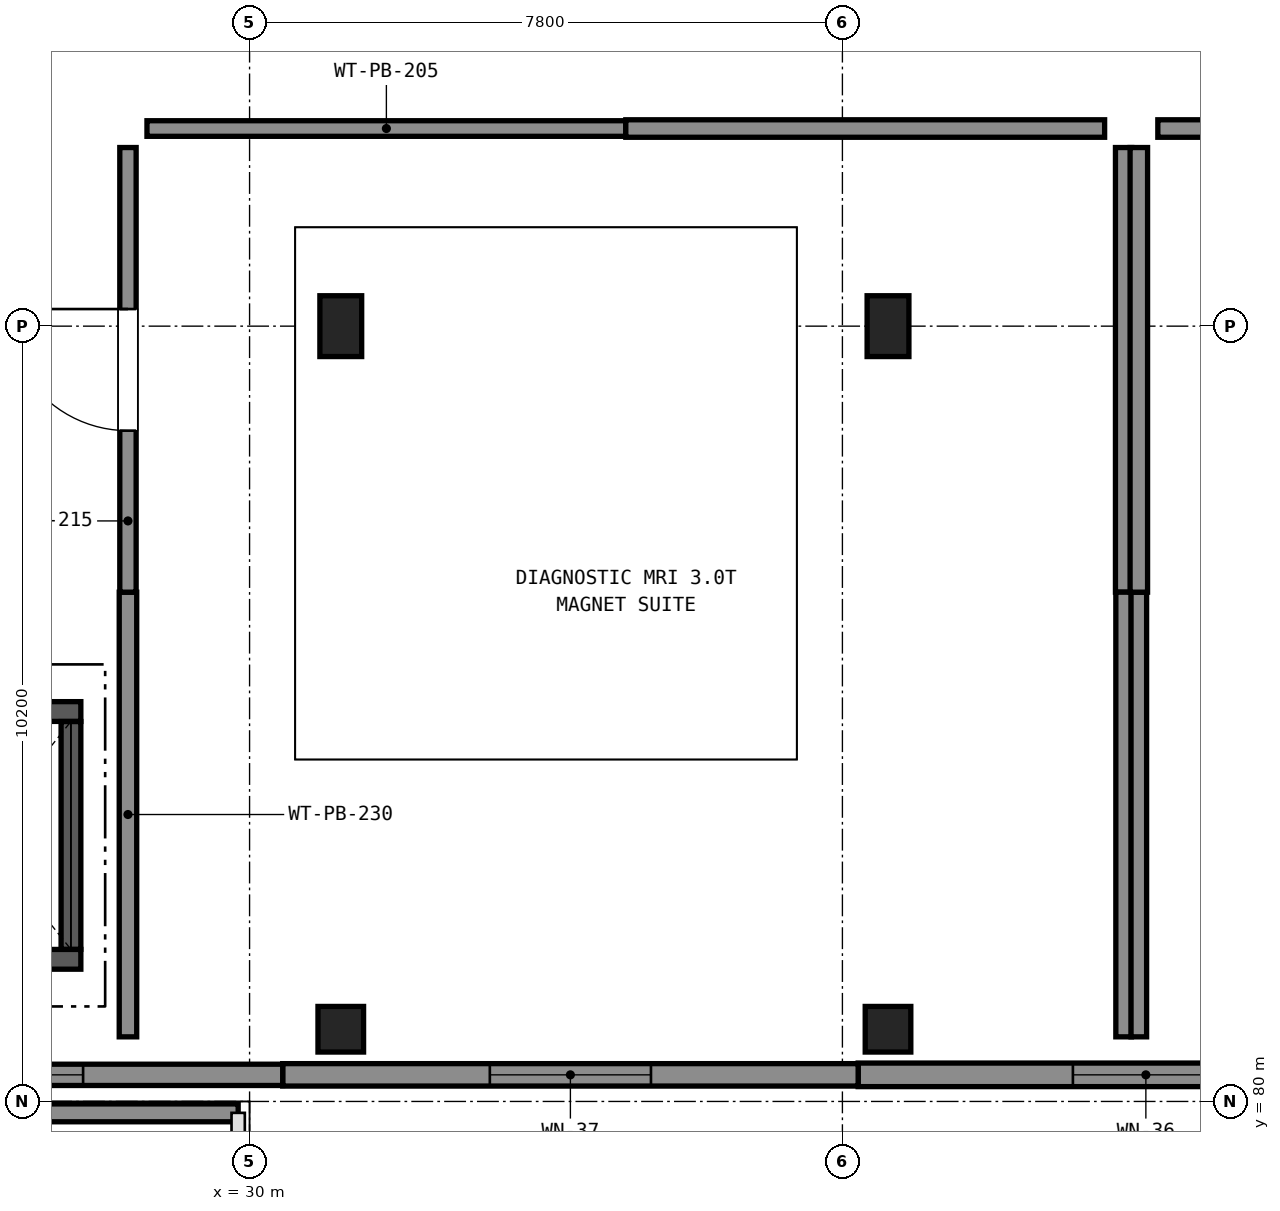
"""IFC4 building model, lengths in metres.
Left out: names, types, materials, properties, quantities, classifications, styles, units other than length and angle.
Written with IfcOpenShell. Run it as: python <this file> out.ifc"""

import sys

from ifc_helpers import new_model, si_unit, direction, frame, frame_2d, origin, origin_2d, place, context, subcontext, project, spatial, rectangle, extrude, element, fill, save


model = new_model("IFC4")
c1 = context("Model", 3, precision=1e-05, world=origin(), true_north=direction((0.0, 1.0)))
c2 = subcontext(c1, "Body", "Model", "MODEL_VIEW")
j1 = project(units=[si_unit("LENGTHUNIT", "METRE"), si_unit("PLANEANGLEUNIT", "RADIAN")], contexts=[c1])
p1 = place(None, origin())
s1 = spatial("IfcSite", under=j1, at=p1, CompositionType="ELEMENT")
p2 = place(p1, origin())
s2 = spatial("IfcBuilding", under=s1, at=p2, CompositionType="ELEMENT")
p3 = place(p2, origin())
s3 = spatial("IfcBuildingStorey", under=s2, at=p3, CompositionType="ELEMENT", Elevation=0.0)
p4 = place(p3, frame((31.2, 80.95, 0.0), z_axis=(0.0, 0.0, 1.0), x_axis=(1.0, 0.0, 0.0)))
e1 = element("IfcColumn", 1, at=p4, inside=s3, PredefinedType="COLUMN", context=c2, shape_type="SweptSolid", body=[
    extrude(rectangle(XDim=0.6, YDim=0.6, at=origin_2d()), origin(), (0.0, 0.0, 1.0), 5.1),
])
p5 = place(p3, frame((31.2, 90.2, 0.0), z_axis=(0.0, 0.0, 1.0), x_axis=(1.0, 0.0, 0.0)))
e2 = element("IfcColumn", 2, at=p5, inside=s3, PredefinedType="COLUMN", context=c2, shape_type="SweptSolid", body=[
    extrude(rectangle(XDim=0.55, YDim=0.8, at=origin_2d()), origin(), (0.0, 0.0, 1.0), 5.1),
])
p6 = place(p3, frame((38.4, 80.95, 0.0), z_axis=(0.0, 0.0, 1.0), x_axis=(1.0, 0.0, 0.0)))
e3 = element("IfcColumn", 3, at=p6, inside=s3, PredefinedType="COLUMN", context=c2, shape_type="SweptSolid", body=[
    extrude(rectangle(XDim=0.6, YDim=0.6, at=origin_2d()), origin(), (0.0, 0.0, 1.0), 5.1),
])
p7 = place(p3, frame((38.4, 90.2, 0.0), z_axis=(0.0, 0.0, 1.0), x_axis=(1.0, 0.0, 0.0)))
e4 = element("IfcColumn", 4, at=p7, inside=s3, PredefinedType="COLUMN", context=c2, shape_type="SweptSolid", body=[
    extrude(rectangle(XDim=0.55, YDim=0.8, at=origin_2d()), origin(), (0.0, 0.0, 1.0), 5.1),
])
p8 = place(p3, frame((22.425, 79.85, 0.0), z_axis=(0.0, 0.0, 1.0), x_axis=(1.0, 0.0, 0.0)))
e5 = element("IfcWall", 5, at=p8, inside=s3, PredefinedType="SOLIDWALL", context=c2, shape_type="SweptSolid", body=[
    extrude(rectangle(XDim=7.425, YDim=0.235, at=frame_2d((3.712, 0.0))), origin(), (0.0, 0.0, 1.0), 4.81),
])
p9 = place(p8, frame((2.888, 0.0, 0.9)))
e6 = element("IfcOpeningElement", 6, at=p9, cuts=e5, PredefinedType="OPENING", context=c2, shape_type="SweptSolid", body=[
    extrude(rectangle(XDim=1.65, YDim=1.5, at=frame_2d((0.825, 0.75))), frame((0.0, 0.127, 0.0), z_axis=(0.0, -1.0, 0.0), x_axis=(1.0, 0.0, 0.0)), (0.0, 0.0, 1.0), 0.255),
])
p10 = place(p3, frame((45.579, 80.35, 0.0), z_axis=(0.0, 0.0, 1.0), x_axis=(-1.0, 0.0, 0.0)))
e7 = element("IfcWall", 7, at=p10, inside=s3, PredefinedType="SOLIDWALL", context=c2, shape_type="SweptSolid", body=[
    extrude(rectangle(XDim=7.572, YDim=0.31, at=frame_2d((3.786, 0.0))), origin(), (0.0, 0.0, 1.0), 4.785),
])
p11 = place(p10, frame((2.826, 0.0, 0.9)))
e8 = element("IfcOpeningElement", 8, at=p11, cuts=e7, PredefinedType="OPENING", context=c2, shape_type="SweptSolid", body=[
    extrude(rectangle(XDim=1.92, YDim=1.62, at=frame_2d((0.96, 0.81))), frame((0.0, 0.165, 0.0), z_axis=(0.0, -1.0, 0.0), x_axis=(1.0, 0.0, 0.0)), (0.0, 0.0, 1.0), 0.33),
])
p12 = place(p3, frame((38.007, 80.35, 0.0), z_axis=(0.0, 0.0, 1.0), x_axis=(-1.0, 0.0, 0.0)))
e9 = element("IfcWall", 9, at=p12, inside=s3, PredefinedType="SOLIDWALL", context=c2, shape_type="SweptSolid", body=[
    extrude(rectangle(XDim=7.571, YDim=0.295, at=frame_2d((3.786, 0.0))), origin(), (0.0, 0.0, 1.0), 4.785),
])
p13 = place(p12, frame((2.726, 0.0, 0.9)))
e10 = element("IfcOpeningElement", 10, at=p13, cuts=e9, PredefinedType="OPENING", context=c2, shape_type="SweptSolid", body=[
    extrude(rectangle(XDim=2.12, YDim=1.62, at=frame_2d((1.06, 0.81))), frame((0.0, 0.157, 0.0), z_axis=(0.0, -1.0, 0.0), x_axis=(1.0, 0.0, 0.0)), (0.0, 0.0, 1.0), 0.315),
])
p14 = place(p3, frame((30.436, 80.35, 0.0), z_axis=(0.0, 0.0, 1.0), x_axis=(-1.0, 0.0, 0.0)))
e11 = element("IfcWall", 11, at=p14, inside=s3, PredefinedType="SOLIDWALL", context=c2, shape_type="SweptSolid", body=[
    extrude(rectangle(XDim=7.572, YDim=0.28, at=frame_2d((3.786, 0.0))), origin(), (0.0, 0.0, 1.0), 4.785),
])
p15 = place(p14, frame((2.626, 0.0, 0.9)))
e12 = element("IfcOpeningElement", 12, at=p15, cuts=e11, PredefinedType="OPENING", context=c2, shape_type="SweptSolid", body=[
    extrude(rectangle(XDim=2.32, YDim=1.62, at=frame_2d((1.16, 0.81))), frame((0.0, 0.15, 0.0), z_axis=(0.0, -1.0, 0.0), x_axis=(1.0, 0.0, 0.0)), (0.0, 0.0, 1.0), 0.3),
])
p16 = place(p3, frame((25.122, 81.87, 0.0), z_axis=(0.0, 0.0, 1.0), x_axis=(1.0, 0.0, 0.0)))
e13 = element("IfcWall", 13, at=p16, inside=s3, PredefinedType="SHEAR", context=c2, shape_type="SweptSolid", body=[
    extrude(rectangle(XDim=2.658, YDim=0.26, at=frame_2d((1.329, 0.0))), origin(), (0.0, 0.0, 1.0), 4.785),
])
p17 = place(p3, frame((25.122, 85.13, 0.0), z_axis=(0.0, 0.0, 1.0), x_axis=(1.0, 0.0, 0.0)))
e14 = element("IfcWall", 14, at=p17, inside=s3, PredefinedType="SHEAR", context=c2, shape_type="SweptSolid", body=[
    extrude(rectangle(XDim=2.658, YDim=0.26, at=frame_2d((1.329, 0.0))), origin(), (0.0, 0.0, 1.0), 4.785),
])
p18 = place(p17, frame((0.679, 0.0, 0.0)))
e15 = element("IfcOpeningElement", 15, at=p18, cuts=e14, PredefinedType="OPENING", context=c2, shape_type="SweptSolid", body=[
    extrude(rectangle(XDim=1.3, YDim=2.2, at=frame_2d((0.65, 1.1))), frame((0.0, 0.14, 0.0), z_axis=(0.0, -1.0, 0.0), x_axis=(1.0, 0.0, 0.0)), (0.0, 0.0, 1.0), 0.28),
])
p19 = place(p3, frame((27.65, 82.002, 0.0), z_axis=(0.0, 0.0, 1.0), x_axis=(0.0, 1.0, 0.0)))
e16 = element("IfcWall", 16, at=p19, inside=s3, PredefinedType="SHEAR", context=c2, shape_type="SweptSolid", body=[
    extrude(rectangle(XDim=2.996, YDim=0.26, at=frame_2d((1.498, 0.0))), origin(), (0.0, 0.0, 1.0), 4.785),
])
p20 = place(p3, frame((28.4, 80.85, 0.0), z_axis=(0.0, 0.0, 1.0), x_axis=(0.0, 1.0, 0.0)))
e17 = element("IfcWall", 17, at=p20, inside=s3, PredefinedType="PARTITIONING", context=c2, shape_type="SweptSolid", body=[
    extrude(rectangle(XDim=5.85, YDim=0.23, at=frame_2d((2.925, 0.0))), origin(), (0.0, 0.0, 1.0), 4.425),
])
p21 = place(p3, frame((28.4, 86.7, 0.0), z_axis=(0.0, 0.0, 1.0), x_axis=(0.0, 1.0, 0.0)))
e18 = element("IfcWall", 18, at=p21, inside=s3, PredefinedType="PARTITIONING", context=c2, shape_type="SweptSolid", body=[
    extrude(rectangle(XDim=5.85, YDim=0.215, at=frame_2d((2.925, 0.0))), origin(), (0.0, 0.0, 1.0), 4.425),
])
p22 = place(p21, frame((2.125, 0.0, 0.0)))
e19 = element("IfcOpeningElement", 19, at=p22, cuts=e18, PredefinedType="OPENING", context=c2, shape_type="SweptSolid", body=[
    extrude(rectangle(XDim=1.6, YDim=2.35, at=frame_2d((0.8, 1.175))), frame((0.0, 0.117, 0.0), z_axis=(0.0, -1.0, 0.0), x_axis=(1.0, 0.0, 0.0)), (0.0, 0.0, 1.0), 0.235),
])
p23 = place(p3, frame((28.65, 92.8, 0.0), z_axis=(0.0, 0.0, 1.0), x_axis=(1.0, 0.0, 0.0)))
e20 = element("IfcWall", 20, at=p23, inside=s3, PredefinedType="PARTITIONING", context=c2, shape_type="SweptSolid", body=[
    extrude(rectangle(XDim=6.3, YDim=0.205, at=frame_2d((3.15, 0.0))), origin(), (0.0, 0.0, 1.0), 4.135),
])
p24 = place(p3, frame((34.95, 92.8, 0.0), z_axis=(0.0, 0.0, 1.0), x_axis=(1.0, 0.0, 0.0)))
e21 = element("IfcWall", 21, at=p24, inside=s3, PredefinedType="PARTITIONING", context=c2, shape_type="SweptSolid", body=[
    extrude(rectangle(XDim=6.3, YDim=0.23, at=frame_2d((3.15, 0.0))), origin(), (0.0, 0.0, 1.0), 3.985),
])
p25 = place(p3, frame((41.5, 92.55, 0.0), z_axis=(0.0, 0.0, 1.0), x_axis=(0.0, -1.0, 0.0)))
e22 = element("IfcWall", 22, at=p25, inside=s3, PredefinedType="PARTITIONING", context=c2, shape_type="SweptSolid", body=[
    extrude(rectangle(XDim=5.85, YDim=0.215, at=frame_2d((2.925, 0.0))), origin(), (0.0, 0.0, 1.0), 4.425),
])
p26 = place(p3, frame((41.5, 86.7, 0.0), z_axis=(0.0, 0.0, 1.0), x_axis=(0.0, -1.0, 0.0)))
e23 = element("IfcWall", 23, at=p26, inside=s3, PredefinedType="PARTITIONING", context=c2, shape_type="SweptSolid", body=[
    extrude(rectangle(XDim=5.85, YDim=0.205, at=frame_2d((2.925, 0.0))), origin(), (0.0, 0.0, 1.0), 4.425),
])
p27 = place(p3, frame((41.95, 92.8, 0.0), z_axis=(0.0, 0.0, 1.0), x_axis=(1.0, 0.0, 0.0)))
e24 = element("IfcWall", 24, at=p27, inside=s3, PredefinedType="PARTITIONING", context=c2, shape_type="SweptSolid", body=[
    extrude(rectangle(XDim=5.3, YDim=0.23, at=frame_2d((2.65, 0.0))), origin(), (0.0, 0.0, 1.0), 4.185),
])
p28 = place(p27, frame((1.8, 0.0, 0.0)))
e25 = element("IfcOpeningElement", 25, at=p28, cuts=e24, PredefinedType="OPENING", context=c2, shape_type="SweptSolid", body=[
    extrude(rectangle(XDim=1.7, YDim=2.35, at=frame_2d((0.85, 1.175))), frame((0.0, 0.125, 0.0), z_axis=(0.0, -1.0, 0.0), x_axis=(1.0, 0.0, 0.0)), (0.0, 0.0, 1.0), 0.25),
])
p29 = place(p3, frame((41.7, 80.85, 0.0), z_axis=(0.0, 0.0, 1.0), x_axis=(0.0, 1.0, 0.0)))
e26 = element("IfcWall", 26, at=p29, inside=s3, PredefinedType="PARTITIONING", context=c2, shape_type="SweptSolid", body=[
    extrude(rectangle(XDim=5.85, YDim=0.205, at=frame_2d((2.925, 0.0))), origin(), (0.0, 0.0, 1.0), 4.425),
])
p30 = place(p3, frame((41.7, 86.7, 0.0), z_axis=(0.0, 0.0, 1.0), x_axis=(0.0, 1.0, 0.0)))
e27 = element("IfcWall", 27, at=p30, inside=s3, PredefinedType="PARTITIONING", context=c2, shape_type="SweptSolid", body=[
    extrude(rectangle(XDim=5.85, YDim=0.23, at=frame_2d((2.925, 0.0))), origin(), (0.0, 0.0, 1.0), 4.425),
])
p31 = place(p11, origin())
e28 = element("IfcWindow", 28, at=p31, inside=s3, PartitioningType="SINGLE_PANEL", PredefinedType="WINDOW", context=c2, shape_type="SweptSolid", body=[
    extrude(rectangle(XDim=1.92, YDim=1.62, at=frame_2d((0.96, 0.81))), frame((0.0, 0.03, 0.0), z_axis=(0.0, -1.0, 0.0), x_axis=(1.0, 0.0, 0.0)), (0.0, 0.0, 1.0), 0.06),
])
fill(e8, e28)
p32 = place(p13, origin())
e29 = element("IfcWindow", 29, at=p32, inside=s3, PartitioningType="SINGLE_PANEL", PredefinedType="WINDOW", context=c2, shape_type="SweptSolid", body=[
    extrude(rectangle(XDim=2.12, YDim=1.62, at=frame_2d((1.06, 0.81))), frame((0.0, 0.03, 0.0), z_axis=(0.0, -1.0, 0.0), x_axis=(1.0, 0.0, 0.0)), (0.0, 0.0, 1.0), 0.06),
])
fill(e10, e29)
p33 = place(p15, origin())
e30 = element("IfcWindow", 30, at=p33, inside=s3, PartitioningType="SINGLE_PANEL", PredefinedType="WINDOW", context=c2, shape_type="SweptSolid", body=[
    extrude(rectangle(XDim=2.32, YDim=1.62, at=frame_2d((1.16, 0.81))), frame((0.0, 0.03, 0.0), z_axis=(0.0, -1.0, 0.0), x_axis=(1.0, 0.0, 0.0)), (0.0, 0.0, 1.0), 0.06),
])
fill(e12, e30)
p34 = place(p22, origin())
e31 = element("IfcDoor", 31, at=p34, inside=s3, OperationType="SINGLE_SWING_RIGHT", PredefinedType="DOOR", context=c2, shape_type="SweptSolid", body=[
    extrude(rectangle(XDim=1.6, YDim=2.35, at=frame_2d((0.8, 1.175))), frame((0.0, 0.025, 0.0), z_axis=(0.0, -1.0, 0.0), x_axis=(1.0, 0.0, 0.0)), (0.0, 0.0, 1.0), 0.05),
])
fill(e19, e31)
save(model, sys.argv[1])
